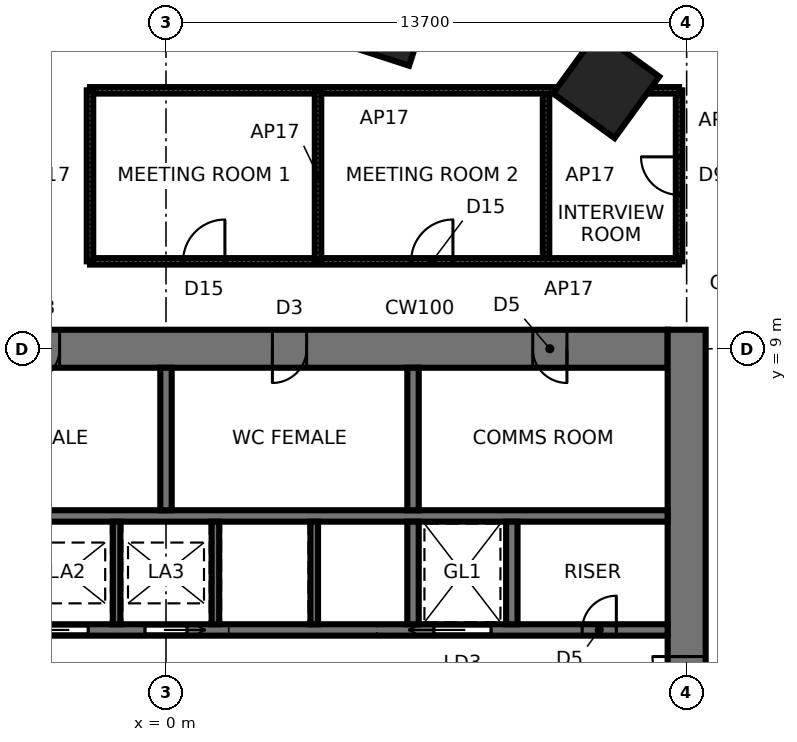
"""IFC4 building model, lengths in metres.
Left out: names, types, materials, properties, quantities, classifications, styles, units other than length and angle.
Written with IfcOpenShell. Run it as: python <this file> out.ifc"""

import sys

from ifc_helpers import new_model, si_unit, direction, frame, frame_2d, origin, origin_2d, place, context, subcontext, project, spatial, rectangle, extrude, element, fill, save


model = new_model("IFC4")
c1 = context("Model", 3, precision=1e-05, world=origin(), true_north=direction((0.0, 1.0)))
c2 = subcontext(c1, "Body", "Model", "MODEL_VIEW")
j1 = project(units=[si_unit("LENGTHUNIT", "METRE"), si_unit("PLANEANGLEUNIT", "RADIAN")], contexts=[c1])
p1 = place(None, origin())
s1 = spatial("IfcSite", under=j1, at=p1, CompositionType="ELEMENT")
p2 = place(p1, origin())
s2 = spatial("IfcBuilding", under=s1, at=p2, CompositionType="ELEMENT")
p3 = place(p2, frame((0.0, 0.0, 57.4)))
s3 = spatial("IfcBuildingStorey", under=s2, at=p3, CompositionType="ELEMENT", Elevation=57.4)
for number, where, z_axis, x_axis in (
    (1, (11.581, 15.94, 0.0), (0.0, 0.0, 1.0), (0.588, 0.809, 0.0)),
    (2, (5.754, 17.708, 0.0), (0.0, 0.0, 1.0), (0.309, 0.951, 0.0)),
):
    element("IfcColumn", number, at=place(p3, frame(where, z_axis=z_axis, x_axis=x_axis)), inside=s3, PredefinedType="COLUMN", context=c2, shape_type="SweptSolid", body=[
        extrude(rectangle(XDim=2.0, YDim=2.0, at=origin_2d()), origin(), (0.0, 0.0, 1.0), 4.2),
    ])
p4 = place(p3, frame((13.2, 9.0, 0.0), z_axis=(0.0, 0.0, 1.0), x_axis=(-1.0, 0.0, 0.0)))
e3 = element("IfcWall", 3, at=p4, inside=s3, PredefinedType="SHEAR", context=c2, shape_type="SweptSolid", body=[
    extrude(rectangle(XDim=26.4, YDim=1.0, at=frame_2d((13.2, 0.0))), origin(), (0.0, 0.0, 1.0), 4.2),
])
p5 = place(p4, frame((2.65, 0.0, 0.0)))
e4 = element("IfcOpeningElement", 4, at=p5, cuts=e3, PredefinedType="OPENING", context=c2, shape_type="SweptSolid", body=[
    extrude(rectangle(XDim=0.9, YDim=2.1, at=frame_2d((0.45, 1.05))), frame((0.0, 0.51, 0.0), z_axis=(0.0, -1.0, 0.0), x_axis=(1.0, 0.0, 0.0)), (0.0, 0.0, 1.0), 1.02),
])
p6 = place(p4, frame((9.5, 0.0, 0.0)))
e5 = element("IfcOpeningElement", 5, at=p6, cuts=e3, PredefinedType="OPENING", context=c2, shape_type="SweptSolid", body=[
    extrude(rectangle(XDim=0.9, YDim=2.1, at=frame_2d((0.45, 1.05))), frame((0.0, 0.51, 0.0), z_axis=(0.0, -1.0, 0.0), x_axis=(1.0, 0.0, 0.0)), (0.0, 0.0, 1.0), 1.02),
])
p7 = place(p4, frame((16.0, 0.0, 0.0)))
e6 = element("IfcOpeningElement", 6, at=p7, cuts=e3, PredefinedType="OPENING", context=c2, shape_type="SweptSolid", body=[
    extrude(rectangle(XDim=0.9, YDim=2.1, at=frame_2d((0.45, 1.05))), frame((0.0, 0.51, 0.0), z_axis=(0.0, -1.0, 0.0), x_axis=(1.0, 0.0, 0.0)), (0.0, 0.0, 1.0), 1.02),
])
p8 = place(p4, frame((21.25, 0.0, 0.0)))
e7 = element("IfcOpeningElement", 7, at=p8, cuts=e3, PredefinedType="OPENING", context=c2, shape_type="SweptSolid", body=[
    extrude(rectangle(XDim=0.9, YDim=2.1, at=frame_2d((0.45, 1.05))), frame((0.0, 0.51, 0.0), z_axis=(0.0, -1.0, 0.0), x_axis=(1.0, 0.0, 0.0)), (0.0, 0.0, 1.0), 1.02),
])
p9 = place(p4, frame((24.8, 0.0, 0.0)))
e8 = element("IfcOpeningElement", 8, at=p9, cuts=e3, PredefinedType="OPENING", context=c2, shape_type="SweptSolid", body=[
    extrude(rectangle(XDim=1.0, YDim=2.1, at=frame_2d((0.5, 1.05))), frame((0.0, 0.51, 0.0), z_axis=(0.0, -1.0, 0.0), x_axis=(1.0, 0.0, 0.0)), (0.0, 0.0, 1.0), 1.02),
])
p10 = place(p3, frame((13.7, -9.5, 0.0), z_axis=(0.0, 0.0, 1.0), x_axis=(0.0, 1.0, 0.0)))
e9 = element("IfcWall", 9, at=p10, inside=s3, PredefinedType="SHEAR", context=c2, shape_type="SweptSolid", body=[
    extrude(rectangle(XDim=19.0, YDim=1.0, at=frame_2d((9.5, 0.0))), origin(), (0.0, 0.0, 1.0), 4.2),
])
p11 = place(p10, frame((8.6, 0.0, 0.0)))
e10 = element("IfcOpeningElement", 10, at=p11, cuts=e9, PredefinedType="OPENING", context=c2, shape_type="SweptSolid", body=[
    extrude(rectangle(XDim=1.8, YDim=2.4, at=frame_2d((0.9, 1.2))), frame((0.0, 0.51, 0.0), z_axis=(0.0, -1.0, 0.0), x_axis=(1.0, 0.0, 0.0)), (0.0, 0.0, 1.0), 1.02),
])
p12 = place(p3, frame((-13.2, 1.6, 0.0), z_axis=(0.0, 0.0, 1.0), x_axis=(1.0, 0.0, 0.0)))
e11 = element("IfcWall", 11, at=p12, inside=s3, PredefinedType="SHEAR", context=c2, shape_type="SweptSolid", body=[
    extrude(rectangle(XDim=26.4, YDim=0.3, at=frame_2d((13.2, 0.0))), origin(), (0.0, 0.0, 1.0), 4.2),
])
p13 = place(p12, frame((0.25, 0.0, 0.0)))
e12 = element("IfcOpeningElement", 12, at=p13, cuts=e11, PredefinedType="OPENING", context=c2, shape_type="SweptSolid", body=[
    extrude(rectangle(XDim=1.0, YDim=2.1, at=frame_2d((0.5, 1.05))), frame((0.0, 0.16, 0.0), z_axis=(0.0, -1.0, 0.0), x_axis=(1.0, 0.0, 0.0)), (0.0, 0.0, 1.0), 0.32),
])
p14 = place(p12, frame((20.25, 0.0, 0.0)))
e13 = element("IfcOpeningElement", 13, at=p14, cuts=e11, PredefinedType="OPENING", context=c2, shape_type="SweptSolid", body=[
    extrude(rectangle(XDim=1.5, YDim=2.4, at=frame_2d((0.75, 1.2))), frame((0.0, 0.16, 0.0), z_axis=(0.0, -1.0, 0.0), x_axis=(1.0, 0.0, 0.0)), (0.0, 0.0, 1.0), 0.32),
])
p15 = place(p12, frame((7.45, 0.0, 0.0)))
e14 = element("IfcOpeningElement", 14, at=p15, cuts=e11, PredefinedType="OPENING", context=c2, shape_type="SweptSolid", body=[
    extrude(rectangle(XDim=1.1, YDim=2.3, at=frame_2d((0.55, 1.15))), frame((0.0, 0.16, 0.0), z_axis=(0.0, -1.0, 0.0), x_axis=(1.0, 0.0, 0.0)), (0.0, 0.0, 1.0), 0.32),
])
p16 = place(p12, frame((10.05, 0.0, 0.0)))
e15 = element("IfcOpeningElement", 15, at=p16, cuts=e11, PredefinedType="OPENING", context=c2, shape_type="SweptSolid", body=[
    extrude(rectangle(XDim=1.1, YDim=2.3, at=frame_2d((0.55, 1.15))), frame((0.0, 0.16, 0.0), z_axis=(0.0, -1.0, 0.0), x_axis=(1.0, 0.0, 0.0)), (0.0, 0.0, 1.0), 0.32),
])
p17 = place(p12, frame((12.65, 0.0, 0.0)))
e16 = element("IfcOpeningElement", 16, at=p17, cuts=e11, PredefinedType="OPENING", context=c2, shape_type="SweptSolid", body=[
    extrude(rectangle(XDim=1.1, YDim=2.3, at=frame_2d((0.55, 1.15))), frame((0.0, 0.16, 0.0), z_axis=(0.0, -1.0, 0.0), x_axis=(1.0, 0.0, 0.0)), (0.0, 0.0, 1.0), 0.32),
])
p18 = place(p12, frame((24.15, 0.0, 0.0)))
e17 = element("IfcOpeningElement", 17, at=p18, cuts=e11, PredefinedType="OPENING", context=c2, shape_type="SweptSolid", body=[
    extrude(rectangle(XDim=0.9, YDim=2.1, at=frame_2d((0.45, 1.05))), frame((0.0, 0.16, 0.0), z_axis=(0.0, -1.0, 0.0), x_axis=(1.0, 0.0, 0.0)), (0.0, 0.0, 1.0), 0.32),
])
p19 = place(p3, frame((-13.2, 4.6, 0.0), z_axis=(0.0, 0.0, 1.0), x_axis=(1.0, 0.0, 0.0)))
e18 = element("IfcWall", 18, at=p19, inside=s3, PredefinedType="SHEAR", context=c2, shape_type="SweptSolid", body=[
    extrude(rectangle(XDim=26.4, YDim=0.3, at=frame_2d((13.2, 0.0))), origin(), (0.0, 0.0, 1.0), 4.2),
])
p20 = place(p3, frame((6.5, 1.75, 0.0), z_axis=(0.0, 0.0, 1.0), x_axis=(0.0, 1.0, 0.0)))
e19 = element("IfcWall", 19, at=p20, inside=s3, PredefinedType="SHEAR", context=c2, shape_type="SweptSolid", body=[
    extrude(rectangle(XDim=2.7, YDim=0.3, at=frame_2d((1.35, 0.0))), origin(), (0.0, 0.0, 1.0), 4.2),
])
p21 = place(p3, frame((6.5, 4.75, 0.0), z_axis=(0.0, 0.0, 1.0), x_axis=(0.0, 1.0, 0.0)))
e20 = element("IfcWall", 20, at=p21, inside=s3, PredefinedType="SHEAR", context=c2, shape_type="SweptSolid", body=[
    extrude(rectangle(XDim=3.75, YDim=0.3, at=frame_2d((1.875, 0.0))), origin(), (0.0, 0.0, 1.0), 4.2),
])
for number, where, z_axis, x_axis in (
    (21, (-1.3, 1.75, 0.0), (0.0, 0.0, 1.0), (0.0, 1.0, 0.0)),
    (22, (1.3, 1.75, 0.0), (0.0, 0.0, 1.0), (0.0, 1.0, 0.0)),
    (23, (3.9, 1.75, 0.0), (0.0, 0.0, 1.0), (0.0, 1.0, 0.0)),
):
    element("IfcWall", number, at=place(p3, frame(where, z_axis=z_axis, x_axis=x_axis)), inside=s3, PredefinedType="SHEAR", context=c2, shape_type="SweptSolid", body=[
        extrude(rectangle(XDim=2.7, YDim=0.2, at=frame_2d((1.35, 0.0))), origin(), (0.0, 0.0, 1.0), 4.2),
    ])
p22 = place(p3, frame((0.0, 4.75, 0.0), z_axis=(0.0, 0.0, 1.0), x_axis=(0.0, 1.0, 0.0)))
e24 = element("IfcWall", 24, at=p22, inside=s3, PredefinedType="SHEAR", context=c2, shape_type="SweptSolid", body=[
    extrude(rectangle(XDim=3.75, YDim=0.3, at=frame_2d((1.875, 0.0))), origin(), (0.0, 0.0, 1.0), 4.2),
])
p23 = place(p3, frame((9.1, 1.75, 0.0), z_axis=(0.0, 0.0, 1.0), x_axis=(0.0, 1.0, 0.0)))
e25 = element("IfcWall", 25, at=p23, inside=s3, PredefinedType="SHEAR", context=c2, shape_type="SweptSolid", body=[
    extrude(rectangle(XDim=2.7, YDim=0.3, at=frame_2d((1.35, 0.0))), origin(), (0.0, 0.0, 1.0), 4.2),
])
p24 = place(p3, frame((13.5, 15.8, 0.0), z_axis=(0.0, 0.0, 1.0), x_axis=(0.0, -1.0, 0.0)))
e26 = element("IfcWall", 26, at=p24, inside=s3, PredefinedType="PARTITIONING", context=c2, shape_type="SweptSolid", body=[
    extrude(rectangle(XDim=4.5, YDim=0.17, at=frame_2d((2.25, 0.0))), origin(), (0.0, 0.0, 1.0), 4.04),
])
p25 = place(p24, frame((1.75, 0.0, 0.0)))
e27 = element("IfcOpeningElement", 27, at=p25, cuts=e26, PredefinedType="OPENING", context=c2, shape_type="SweptSolid", body=[
    extrude(rectangle(XDim=1.0, YDim=2.4, at=frame_2d((0.5, 1.2))), frame((0.0, 0.095, 0.0), z_axis=(0.0, -1.0, 0.0), x_axis=(1.0, 0.0, 0.0)), (0.0, 0.0, 1.0), 0.19),
])
p26 = place(p3, frame((10.0, 15.8, 0.0), z_axis=(0.0, 0.0, 1.0), x_axis=(0.0, -1.0, 0.0)))
e28 = element("IfcWall", 28, at=p26, inside=s3, PredefinedType="PARTITIONING", context=c2, shape_type="SweptSolid", body=[
    extrude(rectangle(XDim=4.5, YDim=0.17, at=frame_2d((2.25, 0.0))), origin(), (0.0, 0.0, 1.0), 4.04),
])
p27 = place(p3, frame((13.5, 11.3, 0.0), z_axis=(0.0, 0.0, 1.0), x_axis=(-1.0, 0.0, 0.0)))
e29 = element("IfcWall", 29, at=p27, inside=s3, PredefinedType="PARTITIONING", context=c2, shape_type="SweptSolid", body=[
    extrude(rectangle(XDim=15.5, YDim=0.17, at=frame_2d((7.75, 0.0))), origin(), (0.0, 0.0, 1.0), 4.04),
])
p28 = place(p27, frame((11.95, 0.0, 0.0)))
e30 = element("IfcOpeningElement", 30, at=p28, cuts=e29, PredefinedType="OPENING", context=c2, shape_type="SweptSolid", body=[
    extrude(rectangle(XDim=1.1, YDim=2.4, at=frame_2d((0.55, 1.2))), frame((0.0, 0.095, 0.0), z_axis=(0.0, -1.0, 0.0), x_axis=(1.0, 0.0, 0.0)), (0.0, 0.0, 1.0), 0.19),
])
p29 = place(p27, frame((5.95, 0.0, 0.0)))
e31 = element("IfcOpeningElement", 31, at=p29, cuts=e29, PredefinedType="OPENING", context=c2, shape_type="SweptSolid", body=[
    extrude(rectangle(XDim=1.1, YDim=2.4, at=frame_2d((0.55, 1.2))), frame((0.0, 0.095, 0.0), z_axis=(0.0, -1.0, 0.0), x_axis=(1.0, 0.0, 0.0)), (0.0, 0.0, 1.0), 0.19),
])
p30 = place(p3, frame((-2.0, 15.8, 0.0), z_axis=(0.0, 0.0, 1.0), x_axis=(1.0, 0.0, 0.0)))
e32 = element("IfcWall", 32, at=p30, inside=s3, PredefinedType="PARTITIONING", context=c2, shape_type="SweptSolid", body=[
    extrude(rectangle(XDim=15.5, YDim=0.17, at=frame_2d((7.75, 0.0))), origin(), (0.0, 0.0, 1.0), 4.04),
])
for number, where, z_axis, x_axis in (
    (33, (4.0, 15.8, 0.0), (0.0, 0.0, 1.0), (0.0, -1.0, 0.0)),
    (34, (-2.0, 11.3, 0.0), (0.0, 0.0, 1.0), (0.0, 1.0, 0.0)),
):
    element("IfcWall", number, at=place(p3, frame(where, z_axis=z_axis, x_axis=x_axis)), inside=s3, PredefinedType="PARTITIONING", context=c2, shape_type="SweptSolid", body=[
        extrude(rectangle(XDim=4.5, YDim=0.17, at=frame_2d((2.25, 0.0))), origin(), (0.0, 0.0, 1.0), 4.04),
    ])
p31 = place(p11, origin())
e35 = element("IfcDoor", 35, at=p31, inside=s3, OperationType="DOUBLE_DOOR_SINGLE_SWING", PredefinedType="DOOR", context=c2, shape_type="SweptSolid", body=[
    extrude(rectangle(XDim=1.72, YDim=2.36, at=frame_2d((0.9, 1.18))), frame((0.0, 0.025, 0.0), z_axis=(0.0, -1.0, 0.0), x_axis=(1.0, 0.0, 0.0)), (0.0, 0.0, 1.0), 0.05),
    extrude(rectangle(XDim=0.04, YDim=2.4, at=frame_2d((0.02, 1.2))), frame((0.0, 0.25, 0.0), z_axis=(0.0, -1.0, 0.0), x_axis=(1.0, 0.0, 0.0)), (0.0, 0.0, 1.0), 0.5),
    extrude(rectangle(XDim=0.04, YDim=2.4, at=frame_2d((1.78, 1.2))), frame((0.0, 0.25, 0.0), z_axis=(0.0, -1.0, 0.0), x_axis=(1.0, 0.0, 0.0)), (0.0, 0.0, 1.0), 0.5),
    extrude(rectangle(XDim=1.72, YDim=0.04, at=frame_2d((0.9, 2.38))), frame((0.0, 0.25, 0.0), z_axis=(0.0, -1.0, 0.0), x_axis=(1.0, 0.0, 0.0)), (0.0, 0.0, 1.0), 0.5),
])
fill(e10, e35)
p32 = place(p14, origin())
e36 = element("IfcDoor", 36, at=p32, inside=s3, OperationType="SLIDING_TO_LEFT", PredefinedType="DOOR", context=c2, shape_type="SweptSolid", body=[
    extrude(rectangle(XDim=1.5, YDim=2.4, at=frame_2d((0.75, 1.2))), frame((0.0, 0.025, 0.0), z_axis=(0.0, -1.0, 0.0), x_axis=(1.0, 0.0, 0.0)), (0.0, 0.0, 1.0), 0.05),
])
fill(e13, e36)
p33 = place(p16, origin())
e37 = element("IfcDoor", 37, at=p33, inside=s3, OperationType="SLIDING_TO_LEFT", PredefinedType="DOOR", context=c2, shape_type="SweptSolid", body=[
    extrude(rectangle(XDim=1.1, YDim=2.3, at=frame_2d((0.55, 1.15))), frame((0.0, 0.025, 0.0), z_axis=(0.0, -1.0, 0.0), x_axis=(1.0, 0.0, 0.0)), (0.0, 0.0, 1.0), 0.05),
])
fill(e15, e37)
p34 = place(p17, origin())
e38 = element("IfcDoor", 38, at=p34, inside=s3, OperationType="SLIDING_TO_RIGHT", PredefinedType="DOOR", context=c2, shape_type="SweptSolid", body=[
    extrude(rectangle(XDim=1.1, YDim=2.3, at=frame_2d((0.55, 1.15))), frame((0.0, 0.025, 0.0), z_axis=(0.0, -1.0, 0.0), x_axis=(1.0, 0.0, 0.0)), (0.0, 0.0, 1.0), 0.05),
])
fill(e16, e38)
p35 = place(p18, origin())
e39 = element("IfcDoor", 39, at=p35, inside=s3, OperationType="SINGLE_SWING_RIGHT", PredefinedType="DOOR", context=c2, shape_type="SweptSolid", body=[
    extrude(rectangle(XDim=0.9, YDim=2.1, at=frame_2d((0.45, 1.05))), frame((0.0, 0.025, 0.0), z_axis=(0.0, -1.0, 0.0), x_axis=(1.0, 0.0, 0.0)), (0.0, 0.0, 1.0), 0.05),
])
fill(e17, e39)
p36 = place(p5, origin())
e40 = element("IfcDoor", 40, at=p36, inside=s3, OperationType="SINGLE_SWING_LEFT", PredefinedType="DOOR", context=c2, shape_type="SweptSolid", body=[
    extrude(rectangle(XDim=0.82, YDim=2.06, at=frame_2d((0.45, 1.03))), frame((0.0, 0.025, 0.0), z_axis=(0.0, -1.0, 0.0), x_axis=(1.0, 0.0, 0.0)), (0.0, 0.0, 1.0), 0.05),
    extrude(rectangle(XDim=0.04, YDim=2.1, at=frame_2d((0.02, 1.05))), frame((0.0, 0.25, 0.0), z_axis=(0.0, -1.0, 0.0), x_axis=(1.0, 0.0, 0.0)), (0.0, 0.0, 1.0), 0.5),
    extrude(rectangle(XDim=0.04, YDim=2.1, at=frame_2d((0.88, 1.05))), frame((0.0, 0.25, 0.0), z_axis=(0.0, -1.0, 0.0), x_axis=(1.0, 0.0, 0.0)), (0.0, 0.0, 1.0), 0.5),
    extrude(rectangle(XDim=0.82, YDim=0.04, at=frame_2d((0.45, 2.08))), frame((0.0, 0.25, 0.0), z_axis=(0.0, -1.0, 0.0), x_axis=(1.0, 0.0, 0.0)), (0.0, 0.0, 1.0), 0.5),
])
fill(e4, e40)
p37 = place(p6, origin())
e41 = element("IfcDoor", 41, at=p37, inside=s3, OperationType="SINGLE_SWING_RIGHT", PredefinedType="DOOR", context=c2, shape_type="SweptSolid", body=[
    extrude(rectangle(XDim=0.82, YDim=2.06, at=frame_2d((0.45, 1.03))), frame((0.0, 0.025, 0.0), z_axis=(0.0, -1.0, 0.0), x_axis=(1.0, 0.0, 0.0)), (0.0, 0.0, 1.0), 0.05),
    extrude(rectangle(XDim=0.04, YDim=2.1, at=frame_2d((0.02, 1.05))), frame((0.0, 0.25, 0.0), z_axis=(0.0, -1.0, 0.0), x_axis=(1.0, 0.0, 0.0)), (0.0, 0.0, 1.0), 0.5),
    extrude(rectangle(XDim=0.04, YDim=2.1, at=frame_2d((0.88, 1.05))), frame((0.0, 0.25, 0.0), z_axis=(0.0, -1.0, 0.0), x_axis=(1.0, 0.0, 0.0)), (0.0, 0.0, 1.0), 0.5),
    extrude(rectangle(XDim=0.82, YDim=0.04, at=frame_2d((0.45, 2.08))), frame((0.0, 0.25, 0.0), z_axis=(0.0, -1.0, 0.0), x_axis=(1.0, 0.0, 0.0)), (0.0, 0.0, 1.0), 0.5),
])
fill(e5, e41)
p38 = place(p7, origin())
e42 = element("IfcDoor", 42, at=p38, inside=s3, OperationType="SINGLE_SWING_RIGHT", PredefinedType="DOOR", context=c2, shape_type="SweptSolid", body=[
    extrude(rectangle(XDim=0.82, YDim=2.06, at=frame_2d((0.45, 1.03))), frame((0.0, 0.025, 0.0), z_axis=(0.0, -1.0, 0.0), x_axis=(1.0, 0.0, 0.0)), (0.0, 0.0, 1.0), 0.05),
    extrude(rectangle(XDim=0.04, YDim=2.1, at=frame_2d((0.02, 1.05))), frame((0.0, 0.25, 0.0), z_axis=(0.0, -1.0, 0.0), x_axis=(1.0, 0.0, 0.0)), (0.0, 0.0, 1.0), 0.5),
    extrude(rectangle(XDim=0.04, YDim=2.1, at=frame_2d((0.88, 1.05))), frame((0.0, 0.25, 0.0), z_axis=(0.0, -1.0, 0.0), x_axis=(1.0, 0.0, 0.0)), (0.0, 0.0, 1.0), 0.5),
    extrude(rectangle(XDim=0.82, YDim=0.04, at=frame_2d((0.45, 2.08))), frame((0.0, 0.25, 0.0), z_axis=(0.0, -1.0, 0.0), x_axis=(1.0, 0.0, 0.0)), (0.0, 0.0, 1.0), 0.5),
])
fill(e6, e42)
p39 = place(p28, frame((1.1, 0.0, 0.0), z_axis=(0.0, 0.0, 1.0), x_axis=(-1.0, 0.0, 0.0)))
e43 = element("IfcDoor", 43, at=p39, inside=s3, OperationType="SINGLE_SWING_RIGHT", PredefinedType="DOOR", context=c2, shape_type="SweptSolid", body=[
    extrude(rectangle(XDim=1.1, YDim=2.4, at=frame_2d((0.55, 1.2))), frame((0.0, 0.025, 0.0), z_axis=(0.0, -1.0, 0.0), x_axis=(1.0, 0.0, 0.0)), (0.0, 0.0, 1.0), 0.05),
])
fill(e30, e43)
p40 = place(p29, frame((1.1, 0.0, 0.0), z_axis=(0.0, 0.0, 1.0), x_axis=(-1.0, 0.0, 0.0)))
e44 = element("IfcDoor", 44, at=p40, inside=s3, OperationType="SINGLE_SWING_RIGHT", PredefinedType="DOOR", context=c2, shape_type="SweptSolid", body=[
    extrude(rectangle(XDim=1.1, YDim=2.4, at=frame_2d((0.55, 1.2))), frame((0.0, 0.025, 0.0), z_axis=(0.0, -1.0, 0.0), x_axis=(1.0, 0.0, 0.0)), (0.0, 0.0, 1.0), 0.05),
])
fill(e31, e44)
p41 = place(p25, frame((1.0, 0.0, 0.0), z_axis=(0.0, 0.0, 1.0), x_axis=(-1.0, 0.0, 0.0)))
e45 = element("IfcDoor", 45, at=p41, inside=s3, OperationType="SINGLE_SWING_RIGHT", PredefinedType="DOOR", context=c2, shape_type="SweptSolid", body=[
    extrude(rectangle(XDim=1.0, YDim=2.4, at=frame_2d((0.5, 1.2))), frame((0.0, 0.025, 0.0), z_axis=(0.0, -1.0, 0.0), x_axis=(1.0, 0.0, 0.0)), (0.0, 0.0, 1.0), 0.05),
])
fill(e27, e45)
save(model, sys.argv[1])
